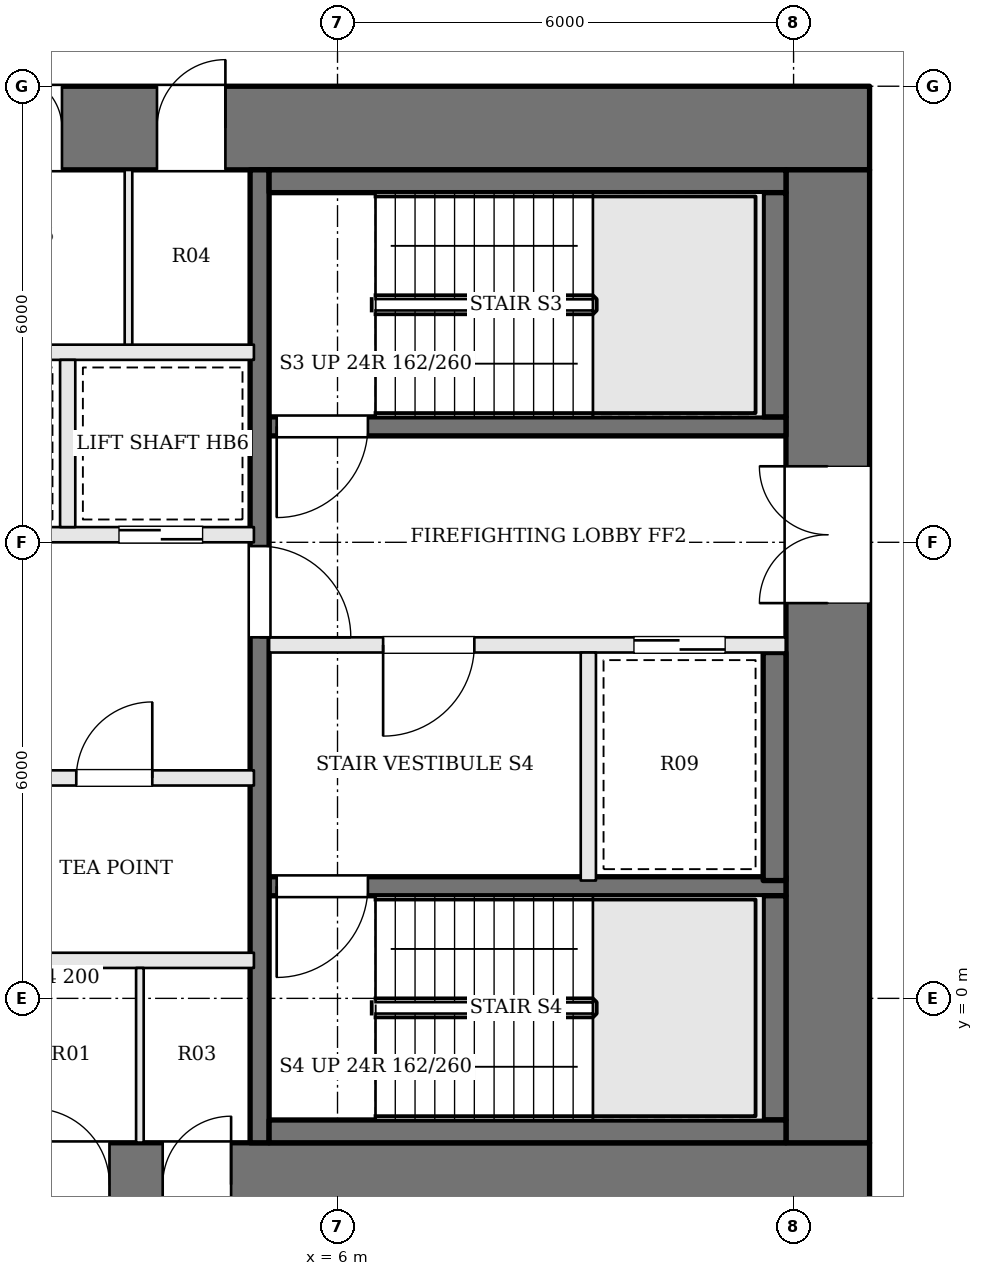
"""IFC4 building model, lengths in metres.
Left out: names, types, materials, properties, quantities, classifications, styles, units other than length and angle.
Written with IfcOpenShell. Run it as: python <this file> out.ifc"""

import sys

from ifc_helpers import new_model, si_unit, direction, frame, frame_2d, origin, place, context, subcontext, project, spatial, rectangle, extrude, element, fill, save


model = new_model("IFC4")
c1 = context("Model", 3, precision=1e-05, world=origin(), true_north=direction((0.0, 1.0)))
c2 = subcontext(c1, "Body", "Model", "MODEL_VIEW")
j1 = project(units=[si_unit("LENGTHUNIT", "METRE"), si_unit("PLANEANGLEUNIT", "RADIAN")], contexts=[c1])
p1 = place(None, origin())
s1 = spatial("IfcSite", under=j1, at=p1, CompositionType="ELEMENT")
p2 = place(p1, origin())
s2 = spatial("IfcBuilding", under=s1, at=p2, CompositionType="ELEMENT")
p3 = place(p2, frame((0.0, 0.0, 153.9)))
s3 = spatial("IfcBuildingStorey", under=s2, at=p3, CompositionType="ELEMENT", Elevation=153.9)
p4 = place(p3, frame((-13.0, 11.45, 0.0), z_axis=(0.0, 0.0, 1.0), x_axis=(1.0, 0.0, 0.0)))
e1 = element("IfcWall", 1, at=p4, inside=s3, PredefinedType="SHEAR", context=c2, shape_type="SweptSolid", body=[
    extrude(rectangle(XDim=26.0, YDim=1.1, at=frame_2d((13.0, 0.0))), origin(), (0.0, 0.0, 1.0), 3.9),
])
p5 = place(p4, frame((9.375, 0.0, 0.0)))
e2 = element("IfcOpeningElement", 2, at=p5, cuts=e1, PredefinedType="OPENING", context=c2, shape_type="SweptSolid", body=[
    extrude(rectangle(XDim=0.7, YDim=2.1, at=frame_2d((0.35, 1.05))), frame((0.0, 0.56, 0.0), z_axis=(0.0, -1.0, 0.0), x_axis=(1.0, 0.0, 0.0)), (0.0, 0.0, 1.0), 1.12),
])
p6 = place(p4, frame((12.075, 0.0, 0.0)))
e3 = element("IfcOpeningElement", 3, at=p6, cuts=e1, PredefinedType="OPENING", context=c2, shape_type="SweptSolid", body=[
    extrude(rectangle(XDim=1.0, YDim=2.1, at=frame_2d((0.5, 1.05))), frame((0.0, 0.56, 0.0), z_axis=(0.0, -1.0, 0.0), x_axis=(1.0, 0.0, 0.0)), (0.0, 0.0, 1.0), 1.12),
])
p7 = place(p4, frame((14.675, 0.0, 0.0)))
e4 = element("IfcOpeningElement", 4, at=p7, cuts=e1, PredefinedType="OPENING", context=c2, shape_type="SweptSolid", body=[
    extrude(rectangle(XDim=0.7, YDim=2.1, at=frame_2d((0.35, 1.05))), frame((0.0, 0.56, 0.0), z_axis=(0.0, -1.0, 0.0), x_axis=(1.0, 0.0, 0.0)), (0.0, 0.0, 1.0), 1.12),
])
p8 = place(p4, frame((16.625, 0.0, 0.0)))
e5 = element("IfcOpeningElement", 5, at=p8, cuts=e1, PredefinedType="OPENING", context=c2, shape_type="SweptSolid", body=[
    extrude(rectangle(XDim=0.9, YDim=2.1, at=frame_2d((0.45, 1.05))), frame((0.0, 0.56, 0.0), z_axis=(0.0, -1.0, 0.0), x_axis=(1.0, 0.0, 0.0)), (0.0, 0.0, 1.0), 1.12),
])
p9 = place(p3, frame((-13.0, -2.45, 0.0), z_axis=(0.0, 0.0, 1.0), x_axis=(1.0, 0.0, 0.0)))
e6 = element("IfcWall", 6, at=p9, inside=s3, PredefinedType="SHEAR", context=c2, shape_type="SweptSolid", body=[
    extrude(rectangle(XDim=26.0, YDim=1.1, at=frame_2d((13.0, 0.0))), origin(), (0.0, 0.0, 1.0), 3.9),
])
p10 = place(p9, frame((9.275, 0.0, 0.0)))
e7 = element("IfcOpeningElement", 7, at=p10, cuts=e6, PredefinedType="OPENING", context=c2, shape_type="SweptSolid", body=[
    extrude(rectangle(XDim=0.9, YDim=2.1, at=frame_2d((0.45, 1.05))), frame((0.0, 0.56, 0.0), z_axis=(0.0, -1.0, 0.0), x_axis=(1.0, 0.0, 0.0)), (0.0, 0.0, 1.0), 1.12),
])
p11 = place(p9, frame((12.525, 0.0, 0.0)))
e8 = element("IfcOpeningElement", 8, at=p11, cuts=e6, PredefinedType="OPENING", context=c2, shape_type="SweptSolid", body=[
    extrude(rectangle(XDim=0.9, YDim=2.1, at=frame_2d((0.45, 1.05))), frame((0.0, 0.56, 0.0), z_axis=(0.0, -1.0, 0.0), x_axis=(1.0, 0.0, 0.0)), (0.0, 0.0, 1.0), 1.12),
])
p12 = place(p9, frame((15.0, 0.0, 0.0)))
e9 = element("IfcOpeningElement", 9, at=p12, cuts=e6, PredefinedType="OPENING", context=c2, shape_type="SweptSolid", body=[
    extrude(rectangle(XDim=1.0, YDim=2.1, at=frame_2d((0.5, 1.05))), frame((0.0, 0.56, 0.0), z_axis=(0.0, -1.0, 0.0), x_axis=(1.0, 0.0, 0.0)), (0.0, 0.0, 1.0), 1.12),
])
p13 = place(p9, frame((16.7, 0.0, 0.0)))
e10 = element("IfcOpeningElement", 10, at=p13, cuts=e6, PredefinedType="OPENING", context=c2, shape_type="SweptSolid", body=[
    extrude(rectangle(XDim=0.9, YDim=2.1, at=frame_2d((0.45, 1.05))), frame((0.0, 0.56, 0.0), z_axis=(0.0, -1.0, 0.0), x_axis=(1.0, 0.0, 0.0)), (0.0, 0.0, 1.0), 1.12),
])
p14 = place(p3, frame((12.45, -1.9, 0.0), z_axis=(0.0, 0.0, 1.0), x_axis=(0.0, 1.0, 0.0)))
e11 = element("IfcWall", 11, at=p14, inside=s3, PredefinedType="SHEAR", context=c2, shape_type="SweptSolid", body=[
    extrude(rectangle(XDim=12.8, YDim=1.1, at=frame_2d((6.4, 0.0))), origin(), (0.0, 0.0, 1.0), 3.9),
])
p15 = place(p14, frame((7.1, 0.0, 0.0)))
e12 = element("IfcOpeningElement", 12, at=p15, cuts=e11, PredefinedType="OPENING", context=c2, shape_type="SweptSolid", body=[
    extrude(rectangle(XDim=1.8, YDim=2.1, at=frame_2d((0.9, 1.05))), frame((0.0, 0.56, 0.0), z_axis=(0.0, -1.0, 0.0), x_axis=(1.0, 0.0, 0.0)), (0.0, 0.0, 1.0), 1.12),
])
p16 = place(p3, frame((11.9, 7.525, 0.0), z_axis=(0.0, 0.0, 1.0), x_axis=(-1.0, 0.0, 0.0)))
e13 = element("IfcWall", 13, at=p16, inside=s3, PredefinedType="SOLIDWALL", context=c2, shape_type="SweptSolid", body=[
    extrude(rectangle(XDim=6.8, YDim=0.25, at=frame_2d((3.4, 0.0))), origin(), (0.0, 0.0, 1.0), 3.7),
])
p17 = place(p16, frame((5.5, 0.0, 0.0)))
e14 = element("IfcOpeningElement", 14, at=p17, cuts=e13, PredefinedType="OPENING", context=c2, shape_type="SweptSolid", body=[
    extrude(rectangle(XDim=1.2, YDim=2.1, at=frame_2d((0.6, 1.05))), frame((0.0, 0.135, 0.0), z_axis=(0.0, -1.0, 0.0), x_axis=(1.0, 0.0, 0.0)), (0.0, 0.0, 1.0), 0.27),
])
p18 = place(p3, frame((11.9, 4.65, 0.0), z_axis=(0.0, 0.0, 1.0), x_axis=(-1.0, 0.0, 0.0)))
e15 = element("IfcWall", 15, at=p18, inside=s3, PredefinedType="SOLIDWALL", context=c2, shape_type="SweptSolid", body=[
    extrude(rectangle(XDim=6.8, YDim=0.2, at=frame_2d((3.4, 0.0))), origin(), (0.0, 0.0, 1.0), 3.7),
])
p19 = place(p18, frame((4.1, 0.0, 0.0)))
e16 = element("IfcOpeningElement", 16, at=p19, cuts=e15, PredefinedType="OPENING", context=c2, shape_type="SweptSolid", body=[
    extrude(rectangle(XDim=1.2, YDim=2.1, at=frame_2d((0.6, 1.05))), frame((0.0, 0.11, 0.0), z_axis=(0.0, -1.0, 0.0), x_axis=(1.0, 0.0, 0.0)), (0.0, 0.0, 1.0), 0.22),
])
p20 = place(p18, frame((0.8, 0.0, 0.0)))
e17 = element("IfcOpeningElement", 17, at=p20, cuts=e15, PredefinedType="OPENING", context=c2, shape_type="SweptSolid", body=[
    extrude(rectangle(XDim=1.2, YDim=2.1, at=frame_2d((0.6, 1.05))), frame((0.0, 0.11, 0.0), z_axis=(0.0, -1.0, 0.0), x_axis=(1.0, 0.0, 0.0)), (0.0, 0.0, 1.0), 0.22),
])
p21 = place(p3, frame((11.9, 1.475, 0.0), z_axis=(0.0, 0.0, 1.0), x_axis=(-1.0, 0.0, 0.0)))
e18 = element("IfcWall", 18, at=p21, inside=s3, PredefinedType="SOLIDWALL", context=c2, shape_type="SweptSolid", body=[
    extrude(rectangle(XDim=6.8, YDim=0.25, at=frame_2d((3.4, 0.0))), origin(), (0.0, 0.0, 1.0), 3.7),
])
p22 = place(p21, frame((5.5, 0.0, 0.0)))
e19 = element("IfcOpeningElement", 19, at=p22, cuts=e18, PredefinedType="OPENING", context=c2, shape_type="SweptSolid", body=[
    extrude(rectangle(XDim=1.2, YDim=2.1, at=frame_2d((0.6, 1.05))), frame((0.0, 0.135, 0.0), z_axis=(0.0, -1.0, 0.0), x_axis=(1.0, 0.0, 0.0)), (0.0, 0.0, 1.0), 0.27),
])
p23 = place(p3, frame((9.3, 4.55, 0.0), z_axis=(0.0, 0.0, 1.0), x_axis=(0.0, -1.0, 0.0)))
e20 = element("IfcWall", 20, at=p23, inside=s3, PredefinedType="SOLIDWALL", context=c2, shape_type="SweptSolid", body=[
    extrude(rectangle(XDim=3.0, YDim=0.2, at=frame_2d((1.5, 0.0))), origin(), (0.0, 0.0, 1.0), 3.7),
])
p24 = place(p3, frame((4.975, 10.9, 0.0), z_axis=(0.0, 0.0, 1.0), x_axis=(0.0, -1.0, 0.0)))
e21 = element("IfcWall", 21, at=p24, inside=s3, PredefinedType="SOLIDWALL", context=c2, shape_type="SweptSolid", body=[
    extrude(rectangle(XDim=12.8, YDim=0.25, at=frame_2d((6.4, 0.0))), origin(), (0.0, 0.0, 1.0), 3.7),
])
p25 = place(p24, frame((4.95, 0.0, 0.0)))
e22 = element("IfcOpeningElement", 22, at=p25, cuts=e21, PredefinedType="OPENING", context=c2, shape_type="SweptSolid", body=[
    extrude(rectangle(XDim=1.2, YDim=2.1, at=frame_2d((0.6, 1.05))), frame((0.0, 0.135, 0.0), z_axis=(0.0, -1.0, 0.0), x_axis=(1.0, 0.0, 0.0)), (0.0, 0.0, 1.0), 0.27),
])
p26 = place(p3, frame((11.9, 10.75, 0.0), z_axis=(0.0, 0.0, 1.0), x_axis=(-1.0, 0.0, 0.0)))
e23 = element("IfcWall", 23, at=p26, inside=s3, PredefinedType="SOLIDWALL", context=c2, shape_type="SweptSolid", body=[
    extrude(rectangle(XDim=6.8, YDim=0.3, at=frame_2d((3.4, 0.0))), origin(), (0.0, 0.0, 1.0), 3.7),
])
p27 = place(p3, frame((11.75, 10.6, 0.0), z_axis=(0.0, 0.0, 1.0), x_axis=(0.0, -1.0, 0.0)))
e24 = element("IfcWall", 24, at=p27, inside=s3, PredefinedType="SOLIDWALL", context=c2, shape_type="SweptSolid", body=[
    extrude(rectangle(XDim=2.95, YDim=0.3, at=frame_2d((1.475, 0.0))), origin(), (0.0, 0.0, 1.0), 3.7),
])
p28 = place(p3, frame((11.75, 4.55, 0.0), z_axis=(0.0, 0.0, 1.0), x_axis=(0.0, -1.0, 0.0)))
e25 = element("IfcWall", 25, at=p28, inside=s3, PredefinedType="SOLIDWALL", context=c2, shape_type="SweptSolid", body=[
    extrude(rectangle(XDim=3.0, YDim=0.3, at=frame_2d((1.5, 0.0))), origin(), (0.0, 0.0, 1.0), 3.7),
])
p29 = place(p3, frame((11.75, 1.35, 0.0), z_axis=(0.0, 0.0, 1.0), x_axis=(0.0, -1.0, 0.0)))
e26 = element("IfcWall", 26, at=p29, inside=s3, PredefinedType="SOLIDWALL", context=c2, shape_type="SweptSolid", body=[
    extrude(rectangle(XDim=2.95, YDim=0.3, at=frame_2d((1.475, 0.0))), origin(), (0.0, 0.0, 1.0), 3.7),
])
p30 = place(p3, frame((11.9, -1.75, 0.0), z_axis=(0.0, 0.0, 1.0), x_axis=(-1.0, 0.0, 0.0)))
e27 = element("IfcWall", 27, at=p30, inside=s3, PredefinedType="SOLIDWALL", context=c2, shape_type="SweptSolid", body=[
    extrude(rectangle(XDim=6.8, YDim=0.3, at=frame_2d((3.4, 0.0))), origin(), (0.0, 0.0, 1.0), 3.7),
])
p31 = place(p3, frame((-4.9, 0.5, 0.0), z_axis=(0.0, 0.0, 1.0), x_axis=(1.0, 0.0, 0.0)))
e28 = element("IfcWall", 28, at=p31, inside=s3, PredefinedType="SOLIDWALL", context=c2, shape_type="SweptSolid", body=[
    extrude(rectangle(XDim=9.8, YDim=0.2, at=frame_2d((4.9, 0.0))), origin(), (0.0, 0.0, 1.0), 3.7),
])
p32 = place(p3, frame((-4.9, 2.9, 0.0), z_axis=(0.0, 0.0, 1.0), x_axis=(1.0, 0.0, 0.0)))
e29 = element("IfcWall", 29, at=p32, inside=s3, PredefinedType="SOLIDWALL", context=c2, shape_type="SweptSolid", body=[
    extrude(rectangle(XDim=9.8, YDim=0.2, at=frame_2d((4.9, 0.0))), origin(), (0.0, 0.0, 1.0), 3.7),
])
p33 = place(p32, frame((0.675, 0.0, 0.0)))
e30 = element("IfcOpeningElement", 30, at=p33, cuts=e29, PredefinedType="OPENING", context=c2, shape_type="SweptSolid", body=[
    extrude(rectangle(XDim=1.1, YDim=2.1, at=frame_2d((0.55, 1.05))), frame((0.0, 0.11, 0.0), z_axis=(0.0, -1.0, 0.0), x_axis=(1.0, 0.0, 0.0)), (0.0, 0.0, 1.0), 0.22),
])
p34 = place(p32, frame((2.613, 0.0, 0.0)))
e31 = element("IfcOpeningElement", 31, at=p34, cuts=e29, PredefinedType="OPENING", context=c2, shape_type="SweptSolid", body=[
    extrude(rectangle(XDim=0.9, YDim=2.1, at=frame_2d((0.45, 1.05))), frame((0.0, 0.11, 0.0), z_axis=(0.0, -1.0, 0.0), x_axis=(1.0, 0.0, 0.0)), (0.0, 0.0, 1.0), 0.22),
])
p35 = place(p32, frame((4.35, 0.0, 0.0)))
e32 = element("IfcOpeningElement", 32, at=p35, cuts=e29, PredefinedType="OPENING", context=c2, shape_type="SweptSolid", body=[
    extrude(rectangle(XDim=1.1, YDim=2.1, at=frame_2d((0.55, 1.05))), frame((0.0, 0.11, 0.0), z_axis=(0.0, -1.0, 0.0), x_axis=(1.0, 0.0, 0.0)), (0.0, 0.0, 1.0), 0.22),
])
p36 = place(p32, frame((7.463, 0.0, 0.0)))
e33 = element("IfcOpeningElement", 33, at=p36, cuts=e29, PredefinedType="OPENING", context=c2, shape_type="SweptSolid", body=[
    extrude(rectangle(XDim=1.0, YDim=2.1, at=frame_2d((0.5, 1.05))), frame((0.0, 0.11, 0.0), z_axis=(0.0, -1.0, 0.0), x_axis=(1.0, 0.0, 0.0)), (0.0, 0.0, 1.0), 0.22),
])
p37 = place(p3, frame((-4.9, 6.1, 0.0), z_axis=(0.0, 0.0, 1.0), x_axis=(1.0, 0.0, 0.0)))
e34 = element("IfcWall", 34, at=p37, inside=s3, PredefinedType="SOLIDWALL", context=c2, shape_type="SweptSolid", body=[
    extrude(rectangle(XDim=9.8, YDim=0.2, at=frame_2d((4.9, 0.0))), origin(), (0.0, 0.0, 1.0), 3.7),
])
p38 = place(p37, frame((0.675, 0.0, 0.0)))
e35 = element("IfcOpeningElement", 35, at=p38, cuts=e34, PredefinedType="OPENING", context=c2, shape_type="SweptSolid", body=[
    extrude(rectangle(XDim=1.1, YDim=2.1, at=frame_2d((0.55, 1.05))), frame((0.0, 0.11, 0.0), z_axis=(0.0, -1.0, 0.0), x_axis=(1.0, 0.0, 0.0)), (0.0, 0.0, 1.0), 0.22),
])
p39 = place(p37, frame((3.125, 0.0, 0.0)))
e36 = element("IfcOpeningElement", 36, at=p39, cuts=e34, PredefinedType="OPENING", context=c2, shape_type="SweptSolid", body=[
    extrude(rectangle(XDim=1.1, YDim=2.1, at=frame_2d((0.55, 1.05))), frame((0.0, 0.11, 0.0), z_axis=(0.0, -1.0, 0.0), x_axis=(1.0, 0.0, 0.0)), (0.0, 0.0, 1.0), 0.22),
])
p40 = place(p37, frame((5.575, 0.0, 0.0)))
e37 = element("IfcOpeningElement", 37, at=p40, cuts=e34, PredefinedType="OPENING", context=c2, shape_type="SweptSolid", body=[
    extrude(rectangle(XDim=1.1, YDim=2.1, at=frame_2d((0.55, 1.05))), frame((0.0, 0.11, 0.0), z_axis=(0.0, -1.0, 0.0), x_axis=(1.0, 0.0, 0.0)), (0.0, 0.0, 1.0), 0.22),
])
p41 = place(p37, frame((8.025, 0.0, 0.0)))
e38 = element("IfcOpeningElement", 38, at=p41, cuts=e34, PredefinedType="OPENING", context=c2, shape_type="SweptSolid", body=[
    extrude(rectangle(XDim=1.1, YDim=2.1, at=frame_2d((0.55, 1.05))), frame((0.0, 0.11, 0.0), z_axis=(0.0, -1.0, 0.0), x_axis=(1.0, 0.0, 0.0)), (0.0, 0.0, 1.0), 0.22),
])
p42 = place(p3, frame((-4.9, 8.5, 0.0), z_axis=(0.0, 0.0, 1.0), x_axis=(1.0, 0.0, 0.0)))
e39 = element("IfcWall", 39, at=p42, inside=s3, PredefinedType="SOLIDWALL", context=c2, shape_type="SweptSolid", body=[
    extrude(rectangle(XDim=9.8, YDim=0.2, at=frame_2d((4.9, 0.0))), origin(), (0.0, 0.0, 1.0), 3.7),
])
p43 = place(p3, frame((2.45, 6.2, 0.0), z_axis=(0.0, 0.0, 1.0), x_axis=(0.0, 1.0, 0.0)))
e40 = element("IfcWall", 40, at=p43, inside=s3, PredefinedType="SOLIDWALL", context=c2, shape_type="SweptSolid", body=[
    extrude(rectangle(XDim=2.2, YDim=0.2, at=frame_2d((1.1, 0.0))), origin(), (0.0, 0.0, 1.0), 3.7),
])
for number, where, z_axis, x_axis in (
    (41, (3.4, -1.9, 0.0), (0.0, 0.0, 1.0), (0.0, 1.0, 0.0)),
    (42, (3.25, 8.6, 0.0), (0.0, 0.0, 1.0), (0.0, 1.0, 0.0)),
):
    element("IfcWall", number, at=place(p3, frame(where, z_axis=z_axis, x_axis=x_axis)), inside=s3, PredefinedType="PARTITIONING", context=c2, shape_type="SweptSolid", body=[
        extrude(rectangle(XDim=2.3, YDim=0.1, at=frame_2d((1.15, 0.0))), origin(), (0.0, 0.0, 1.0), 3.7),
    ])
p44 = place(p15, origin())
e43 = element("IfcDoor", 43, at=p44, inside=s3, OperationType="DOUBLE_DOOR_SINGLE_SWING", PredefinedType="DOOR", context=c2, shape_type="SweptSolid", body=[
    extrude(rectangle(XDim=1.8, YDim=2.1, at=frame_2d((0.9, 1.05))), frame((0.0, 0.025, 0.0), z_axis=(0.0, -1.0, 0.0), x_axis=(1.0, 0.0, 0.0)), (0.0, 0.0, 1.0), 0.05),
])
fill(e12, e43)
p45 = place(p25, origin())
e44 = element("IfcDoor", 44, at=p45, inside=s3, OperationType="SINGLE_SWING_RIGHT", PredefinedType="DOOR", context=c2, shape_type="SweptSolid", body=[
    extrude(rectangle(XDim=1.2, YDim=2.1, at=frame_2d((0.6, 1.05))), frame((0.0, 0.025, 0.0), z_axis=(0.0, -1.0, 0.0), x_axis=(1.0, 0.0, 0.0)), (0.0, 0.0, 1.0), 0.05),
])
fill(e22, e44)
p46 = place(p19, origin())
e45 = element("IfcDoor", 45, at=p46, inside=s3, OperationType="SINGLE_SWING_RIGHT", PredefinedType="DOOR", context=c2, shape_type="SweptSolid", body=[
    extrude(rectangle(XDim=1.2, YDim=2.1, at=frame_2d((0.6, 1.05))), frame((0.0, 0.025, 0.0), z_axis=(0.0, -1.0, 0.0), x_axis=(1.0, 0.0, 0.0)), (0.0, 0.0, 1.0), 0.05),
])
fill(e16, e45)
p47 = place(p17, origin())
e46 = element("IfcDoor", 46, at=p47, inside=s3, OperationType="SINGLE_SWING_RIGHT", PredefinedType="DOOR", context=c2, shape_type="SweptSolid", body=[
    extrude(rectangle(XDim=1.2, YDim=2.1, at=frame_2d((0.6, 1.05))), frame((0.0, 0.025, 0.0), z_axis=(0.0, -1.0, 0.0), x_axis=(1.0, 0.0, 0.0)), (0.0, 0.0, 1.0), 0.05),
])
fill(e14, e46)
p48 = place(p22, origin())
e47 = element("IfcDoor", 47, at=p48, inside=s3, OperationType="SINGLE_SWING_RIGHT", PredefinedType="DOOR", context=c2, shape_type="SweptSolid", body=[
    extrude(rectangle(XDim=1.2, YDim=2.1, at=frame_2d((0.6, 1.05))), frame((0.0, 0.025, 0.0), z_axis=(0.0, -1.0, 0.0), x_axis=(1.0, 0.0, 0.0)), (0.0, 0.0, 1.0), 0.05),
])
fill(e19, e47)
p49 = place(p20, origin())
e48 = element("IfcDoor", 48, at=p49, inside=s3, OperationType="SLIDING_TO_RIGHT", PredefinedType="DOOR", context=c2, shape_type="SweptSolid", body=[
    extrude(rectangle(XDim=1.2, YDim=2.1, at=frame_2d((0.6, 1.05))), frame((0.0, 0.025, 0.0), z_axis=(0.0, -1.0, 0.0), x_axis=(1.0, 0.0, 0.0)), (0.0, 0.0, 1.0), 0.05),
])
fill(e17, e48)
p50 = place(p36, origin())
e49 = element("IfcDoor", 49, at=p50, inside=s3, OperationType="SINGLE_SWING_RIGHT", PredefinedType="DOOR", context=c2, shape_type="SweptSolid", body=[
    extrude(rectangle(XDim=1.0, YDim=2.1, at=frame_2d((0.5, 1.05))), frame((0.0, 0.025, 0.0), z_axis=(0.0, -1.0, 0.0), x_axis=(1.0, 0.0, 0.0)), (0.0, 0.0, 1.0), 0.05),
])
fill(e33, e49)
p51 = place(p41, origin())
e50 = element("IfcDoor", 50, at=p51, inside=s3, OperationType="SLIDING_TO_LEFT", PredefinedType="DOOR", context=c2, shape_type="SweptSolid", body=[
    extrude(rectangle(XDim=1.1, YDim=2.1, at=frame_2d((0.55, 1.05))), frame((0.0, 0.025, 0.0), z_axis=(0.0, -1.0, 0.0), x_axis=(1.0, 0.0, 0.0)), (0.0, 0.0, 1.0), 0.05),
])
fill(e38, e50)
p52 = place(p12, origin())
e51 = element("IfcDoor", 51, at=p52, inside=s3, OperationType="SINGLE_SWING_LEFT", PredefinedType="DOOR", context=c2, shape_type="SweptSolid", body=[
    extrude(rectangle(XDim=1.0, YDim=2.1, at=frame_2d((0.5, 1.05))), frame((0.0, 0.025, 0.0), z_axis=(0.0, -1.0, 0.0), x_axis=(1.0, 0.0, 0.0)), (0.0, 0.0, 1.0), 0.05),
])
fill(e9, e51)
p53 = place(p13, origin())
e52 = element("IfcDoor", 52, at=p53, inside=s3, OperationType="SINGLE_SWING_RIGHT", PredefinedType="DOOR", context=c2, shape_type="SweptSolid", body=[
    extrude(rectangle(XDim=0.9, YDim=2.1, at=frame_2d((0.45, 1.05))), frame((0.0, 0.025, 0.0), z_axis=(0.0, -1.0, 0.0), x_axis=(1.0, 0.0, 0.0)), (0.0, 0.0, 1.0), 0.05),
])
fill(e10, e52)
p54 = place(p7, origin())
e53 = element("IfcDoor", 53, at=p54, inside=s3, OperationType="SINGLE_SWING_LEFT", PredefinedType="DOOR", context=c2, shape_type="SweptSolid", body=[
    extrude(rectangle(XDim=0.7, YDim=2.1, at=frame_2d((0.35, 1.05))), frame((0.0, 0.025, 0.0), z_axis=(0.0, -1.0, 0.0), x_axis=(1.0, 0.0, 0.0)), (0.0, 0.0, 1.0), 0.05),
])
fill(e4, e53)
p55 = place(p8, origin())
e54 = element("IfcDoor", 54, at=p55, inside=s3, OperationType="SINGLE_SWING_RIGHT", PredefinedType="DOOR", context=c2, shape_type="SweptSolid", body=[
    extrude(rectangle(XDim=0.9, YDim=2.1, at=frame_2d((0.45, 1.05))), frame((0.0, 0.025, 0.0), z_axis=(0.0, -1.0, 0.0), x_axis=(1.0, 0.0, 0.0)), (0.0, 0.0, 1.0), 0.05),
])
fill(e5, e54)
save(model, sys.argv[1])
